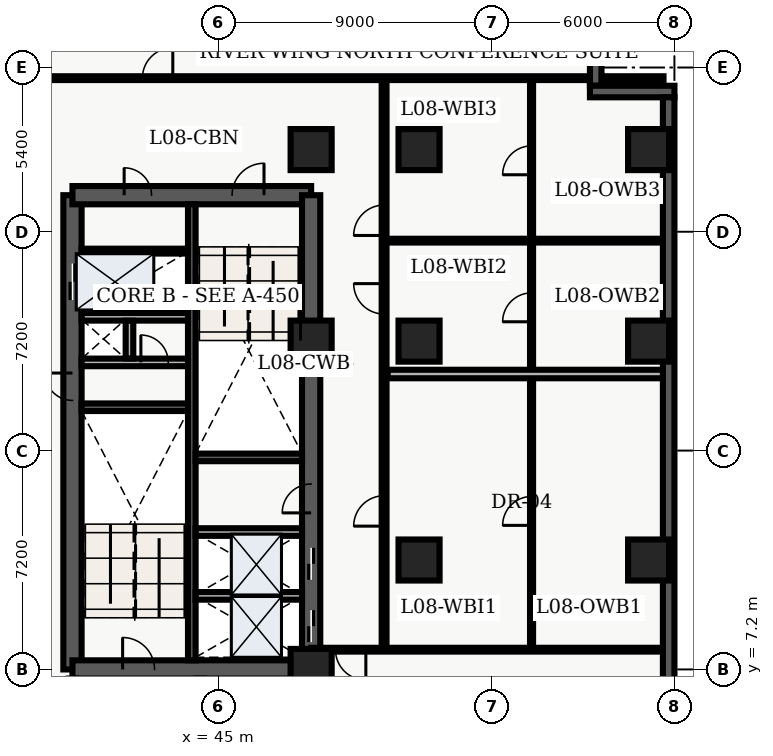
"""IFC4 building model, lengths in metres.
Left out: names, types, materials, properties, quantities, classifications, styles, units other than length and angle.
Written with IfcOpenShell. Run it as: python <this file> out.ifc"""

import sys

from ifc_helpers import new_model, entity, si_unit, converted_unit, direction, frame, origin_with_axes, origin_2d_with_axis, place, context, subcontext, project, spatial, polyline, rectangle, outline, extrude, element, fill, save


model = new_model("IFC4")
c1 = context("Model", 3, precision=1e-05, world=origin_with_axes(), true_north=direction((0.0, 1.0)))
c2 = subcontext(c1, "Body", "Model", "MODEL_VIEW")
j1 = project(units=[si_unit("LENGTHUNIT", "METRE"), converted_unit("PLANEANGLEUNIT", "DEGREE", entity("IfcPlaneAngleMeasure", 0.017), si_unit("PLANEANGLEUNIT", "RADIAN"), dimensions=[0, 0, 0, 0, 0, 0, 0])], contexts=[c1])
p1 = place(None, origin_with_axes())
s1 = spatial("IfcSite", under=j1, at=p1, CompositionType="ELEMENT")
p2 = place(p1, origin_with_axes())
s2 = spatial("IfcBuilding", under=s1, at=p2, CompositionType="ELEMENT")
p3 = place(p2, frame((0.0, 0.0, 36.6), z_axis=(0.0, 0.0, 1.0), x_axis=(1.0, 0.0, 0.0)))
s3 = spatial("IfcBuildingStorey", under=s2, at=p3, CompositionType="ELEMENT", Elevation=36.6)
p4 = place(p3, frame((40.2, 7.2, 0.0), z_axis=(0.0, 0.0, 1.0), x_axis=(0.0, 1.0, 0.0)))
e1 = element("IfcWall", 1, at=p4, inside=s3, PredefinedType="SHEAR", context=c2, shape_type="SweptSolid", body=[
    extrude(outline(polyline([(0.0, -0.3), (15.6, -0.3), (15.6, 0.3), (0.0, 0.3), (0.0, -0.3)])), origin_with_axes(), (0.0, 0.0, 1.0), 3.66),
])
p5 = place(p4, frame((12.75, 0.0, 0.0), z_axis=(0.0, 0.0, 1.0), x_axis=(1.0, 0.0, 0.0)))
e2 = element("IfcOpeningElement", 2, at=p5, cuts=e1, PredefinedType="OPENING", context=c2, shape_type="SweptSolid", body=[
    extrude(rectangle(XDim=1.2, YDim=0.62, at=origin_2d_with_axis()), origin_with_axes(), (0.0, 0.0, 1.0), 2.15),
])
p6 = place(p4, frame((9.3, 0.0, 0.0), z_axis=(0.0, 0.0, 1.0), x_axis=(1.0, 0.0, 0.0)))
e3 = element("IfcOpeningElement", 3, at=p6, cuts=e1, PredefinedType="OPENING", context=c2, shape_type="SweptSolid", body=[
    extrude(rectangle(XDim=0.9, YDim=0.62, at=origin_2d_with_axis()), origin_with_axes(), (0.0, 0.0, 1.0), 2.15),
])
p7 = place(p3, frame((40.2, 7.2, 0.0), z_axis=(0.0, 0.0, 1.0), x_axis=(1.0, 0.0, 0.0)))
e4 = element("IfcWall", 4, at=p7, inside=s3, PredefinedType="SHEAR", context=c2, shape_type="SweptSolid", body=[
    extrude(outline(polyline([(0.0, -0.3), (7.85, -0.3), (7.85, 0.3), (0.0, 0.3), (0.0, -0.3)])), origin_with_axes(), (0.0, 0.0, 1.0), 3.66),
])
p8 = place(p7, frame((2.175, 0.0, 0.0), z_axis=(0.0, 0.0, 1.0), x_axis=(1.0, 0.0, 0.0)))
e5 = element("IfcOpeningElement", 5, at=p8, cuts=e4, PredefinedType="OPENING", context=c2, shape_type="SweptSolid", body=[
    extrude(rectangle(XDim=1.05, YDim=0.62, at=origin_2d_with_axis()), origin_with_axes(), (0.0, 0.0, 1.0), 2.15),
])
p9 = place(p3, frame((40.2, 22.8, 0.0), z_axis=(0.0, 0.0, 1.0), x_axis=(1.0, 0.0, 0.0)))
e6 = element("IfcWall", 6, at=p9, inside=s3, PredefinedType="SHEAR", context=c2, shape_type="SweptSolid", body=[
    extrude(outline(polyline([(0.0, -0.3), (7.85, -0.3), (7.85, 0.3), (0.0, 0.3), (0.0, -0.3)])), origin_with_axes(), (0.0, 0.0, 1.0), 3.66),
])
p10 = place(p9, frame((5.775, 0.0, 0.0), z_axis=(0.0, 0.0, 1.0), x_axis=(1.0, 0.0, 0.0)))
e7 = element("IfcOpeningElement", 7, at=p10, cuts=e6, PredefinedType="OPENING", context=c2, shape_type="SweptSolid", body=[
    extrude(rectangle(XDim=1.05, YDim=0.62, at=origin_2d_with_axis()), origin_with_axes(), (0.0, 0.0, 1.0), 2.15),
])
p11 = place(p9, frame((2.15, 0.0, 0.0), z_axis=(0.0, 0.0, 1.0), x_axis=(1.0, 0.0, 0.0)))
e8 = element("IfcOpeningElement", 8, at=p11, cuts=e6, PredefinedType="OPENING", context=c2, shape_type="SweptSolid", body=[
    extrude(rectangle(XDim=0.9, YDim=0.62, at=origin_2d_with_axis()), origin_with_axes(), (0.0, 0.0, 1.0), 2.15),
])
p12 = place(p3, frame((48.05, 7.2, 0.0), z_axis=(0.0, 0.0, 1.0), x_axis=(0.0, 1.0, 0.0)))
e9 = element("IfcWall", 9, at=p12, inside=s3, PredefinedType="SHEAR", context=c2, shape_type="SweptSolid", body=[
    extrude(outline(polyline([(0.0, -0.3), (15.6, -0.3), (15.6, 0.3), (0.0, 0.3), (0.0, -0.3)])), origin_with_axes(), (0.0, 0.0, 1.0), 3.66),
])
p13 = place(p12, frame((1.425, 0.0, 0.0), z_axis=(0.0, 0.0, 1.0), x_axis=(1.0, 0.0, 0.0)))
e10 = element("IfcOpeningElement", 10, at=p13, cuts=e9, PredefinedType="OPENING", context=c2, shape_type="SweptSolid", body=[
    extrude(rectangle(XDim=1.05, YDim=0.62, at=origin_2d_with_axis()), origin_with_axes(), (0.0, 0.0, 1.0), 2.15),
])
p14 = place(p12, frame((3.475, 0.0, 0.0), z_axis=(0.0, 0.0, 1.0), x_axis=(1.0, 0.0, 0.0)))
e11 = element("IfcOpeningElement", 11, at=p14, cuts=e9, PredefinedType="OPENING", context=c2, shape_type="SweptSolid", body=[
    extrude(rectangle(XDim=1.05, YDim=0.62, at=origin_2d_with_axis()), origin_with_axes(), (0.0, 0.0, 1.0), 2.15),
])
p15 = place(p12, frame((5.625, 0.0, 0.0), z_axis=(0.0, 0.0, 1.0), x_axis=(1.0, 0.0, 0.0)))
e12 = element("IfcOpeningElement", 12, at=p15, cuts=e9, PredefinedType="OPENING", context=c2, shape_type="SweptSolid", body=[
    extrude(rectangle(XDim=0.95, YDim=0.62, at=origin_2d_with_axis()), origin_with_axes(), (0.0, 0.0, 1.0), 2.15),
])
p16 = place(p3, frame((44.125, 7.5, 0.0), z_axis=(0.0, 0.0, 1.0), x_axis=(0.0, 1.0, 0.0)))
e13 = element("IfcWall", 13, at=p16, inside=s3, PredefinedType="SHEAR", context=c2, shape_type="SweptSolid", body=[
    extrude(outline(polyline([(0.0, -0.125), (15.0, -0.125), (15.0, 0.125), (0.0, 0.125), (0.0, -0.125)])), origin_with_axes(), (0.0, 0.0, 1.0), 3.66),
])
for number, where, z_axis, x_axis in (
    (14, (40.5, 15.825, 0.0), (0.0, 0.0, 1.0), (1.0, 0.0, 0.0)),
    (15, (44.25, 14.175, 0.0), (0.0, 0.0, 1.0), (1.0, 0.0, 0.0)),
):
    element("IfcWall", number, at=place(p3, frame(where, z_axis=z_axis, x_axis=x_axis)), inside=s3, PredefinedType="SHEAR", context=c2, shape_type="SweptSolid", body=[
        extrude(outline(polyline([(0.0, -0.125), (3.5, -0.125), (3.5, 0.125), (0.0, 0.125), (0.0, -0.125)])), origin_with_axes(), (0.0, 0.0, 1.0), 3.66),
    ])
p17 = place(p3, frame((40.5, 17.3, 0.0), z_axis=(0.0, 0.0, 1.0), x_axis=(1.0, 0.0, 0.0)))
e16 = element("IfcWall", 16, at=p17, inside=s3, PredefinedType="SOLIDWALL", context=c2, shape_type="SweptSolid", body=[
    extrude(outline(polyline([(0.0, -0.125), (3.5, -0.125), (3.5, 0.125), (0.0, 0.125), (0.0, -0.125)])), origin_with_axes(), (0.0, 0.0, 1.0), 2.7),
])
p18 = place(p17, frame((2.4, 0.0, 0.0), z_axis=(0.0, 0.0, 1.0), x_axis=(1.0, 0.0, 0.0)))
e17 = element("IfcOpeningElement", 17, at=p18, cuts=e16, PredefinedType="OPENING", context=c2, shape_type="SweptSolid", body=[
    extrude(rectangle(XDim=0.9, YDim=0.27, at=origin_2d_with_axis()), origin_with_axes(), (0.0, 0.0, 1.0), 2.15),
])
p19 = place(p3, frame((40.5, 18.8, 0.0), z_axis=(0.0, 0.0, 1.0), x_axis=(1.0, 0.0, 0.0)))
e18 = element("IfcWall", 18, at=p19, inside=s3, PredefinedType="SOLIDWALL", context=c2, shape_type="SweptSolid", body=[
    extrude(outline(polyline([(0.0, -0.125), (3.5, -0.125), (3.5, 0.125), (0.0, 0.125), (0.0, -0.125)])), origin_with_axes(), (0.0, 0.0, 1.0), 2.7),
])
p20 = place(p3, frame((42.075, 17.43, 0.0), z_axis=(0.0, 0.0, 1.0), x_axis=(0.0, 1.0, 0.0)))
e19 = element("IfcWall", 19, at=p20, inside=s3, PredefinedType="SOLIDWALL", context=c2, shape_type="SweptSolid", body=[
    extrude(outline(polyline([(0.0, -0.125), (1.24, -0.125), (1.24, 0.125), (0.0, 0.125), (0.0, -0.125)])), origin_with_axes(), (0.0, 0.0, 1.0), 2.7),
])
for number, where, z_axis, x_axis in (
    (20, (48.05, 7.2, 0.0), (0.0, 0.0, 1.0), (1.0, 0.0, 0.0)),
    (21, (48.05, 18.0, 0.0), (0.0, 0.0, 1.0), (1.0, 0.0, 0.0)),
    (22, (48.05, 24.3, 0.0), (0.0, 0.0, 1.0), (1.0, 0.0, 0.0)),
    (23, (51.6, 10.8, 0.0), (0.0, 0.0, 1.0), (1.0, 0.0, 0.0)),
    (24, (51.6, 18.0, 0.0), (0.0, 0.0, 1.0), (1.0, 0.0, 0.0)),
    (25, (51.6, 24.3, 0.0), (0.0, 0.0, 1.0), (1.0, 0.0, 0.0)),
    (26, (59.15, 10.8, 0.0), (0.0, 0.0, 1.0), (1.0, 0.0, 0.0)),
    (27, (59.15, 18.0, 0.0), (0.0, 0.0, 1.0), (1.0, 0.0, 0.0)),
    (28, (59.15, 24.3, 0.0), (0.0, 0.0, 1.0), (1.0, 0.0, 0.0)),
):
    element("IfcColumn", number, at=place(p3, frame(where, z_axis=z_axis, x_axis=x_axis)), inside=s3, PredefinedType="COLUMN", context=c2, shape_type="SweptSolid", body=[
        extrude(rectangle(XDim=1.35, YDim=1.35, at=origin_2d_with_axis()), origin_with_axes(), (0.0, 0.0, 1.0), 3.9),
    ])
p21 = place(p3, frame((40.5, 20.96, 0.0), z_axis=(0.0, 0.0, 1.0), x_axis=(1.0, 0.0, 0.0)))
e29 = element("IfcWall", 29, at=p21, inside=s3, PredefinedType="PARTITIONING", context=c2, shape_type="SweptSolid", body=[
    extrude(outline(polyline([(0.0, -0.08), (3.5, -0.08), (3.5, 0.08), (0.0, 0.08), (0.0, -0.08)])), origin_with_axes(), (0.0, 0.0, 1.0), 2.7),
])
for number, where, z_axis, x_axis in (
    (30, (44.25, 9.62, 0.0), (0.0, 0.0, 1.0), (1.0, 0.0, 0.0)),
    (31, (44.25, 11.72, 0.0), (0.0, 0.0, 1.0), (1.0, 0.0, 0.0)),
):
    element("IfcWall", number, at=place(p3, frame(where, z_axis=z_axis, x_axis=x_axis)), inside=s3, PredefinedType="SOLIDWALL", context=c2, shape_type="SweptSolid", body=[
        extrude(outline(polyline([(0.0, -0.125), (3.5, -0.125), (3.5, 0.125), (0.0, 0.125), (0.0, -0.125)])), origin_with_axes(), (0.0, 0.0, 1.0), 2.7),
    ])
p22 = place(p3, frame((50.45, 7.85, 0.0), z_axis=(0.0, 0.0, 1.0), x_axis=(0.0, 1.0, 0.0)))
e32 = element("IfcWall", 32, at=p22, inside=s3, PredefinedType="PARTITIONING", context=c2, shape_type="SweptSolid", body=[
    extrude(outline(polyline([(0.0, -0.08), (18.8, -0.08), (18.8, 0.08), (0.0, 0.08), (0.0, -0.08)])), origin_with_axes(), (0.0, 0.0, 1.0), 2.7),
])
p23 = place(p22, frame((4.564, 0.0, 0.0), z_axis=(0.0, 0.0, 1.0), x_axis=(1.0, 0.0, 0.0)))
e33 = element("IfcOpeningElement", 33, at=p23, cuts=e32, PredefinedType="OPENING", context=c2, shape_type="SweptSolid", body=[
    extrude(rectangle(XDim=1.0, YDim=0.18, at=origin_2d_with_axis()), origin_with_axes(), (0.0, 0.0, 1.0), 2.15),
])
p24 = place(p22, frame((11.541, 0.0, 0.0), z_axis=(0.0, 0.0, 1.0), x_axis=(1.0, 0.0, 0.0)))
e34 = element("IfcOpeningElement", 34, at=p24, cuts=e32, PredefinedType="OPENING", context=c2, shape_type="SweptSolid", body=[
    extrude(rectangle(XDim=1.0, YDim=0.18, at=origin_2d_with_axis()), origin_with_axes(), (0.0, 0.0, 1.0), 2.15),
])
p25 = place(p22, frame((14.125, 0.0, 0.0), z_axis=(0.0, 0.0, 1.0), x_axis=(1.0, 0.0, 0.0)))
e35 = element("IfcOpeningElement", 35, at=p25, cuts=e32, PredefinedType="OPENING", context=c2, shape_type="SweptSolid", body=[
    extrude(rectangle(XDim=1.0, YDim=0.18, at=origin_2d_with_axis()), origin_with_axes(), (0.0, 0.0, 1.0), 2.15),
])
p26 = place(p3, frame((59.64, 7.85, 0.0), z_axis=(0.0, 0.0, 1.0), x_axis=(-1.0, 0.0, 0.0)))
e36 = element("IfcWall", 36, at=p26, inside=s3, PredefinedType="PARTITIONING", context=c2, shape_type="SweptSolid", body=[
    extrude(outline(polyline([(0.0, -0.062), (11.59, -0.062), (11.59, 0.062), (0.0, 0.062), (0.0, -0.062)])), origin_with_axes(), (0.0, 0.0, 1.0), 2.7),
])
p27 = place(p26, frame((10.29, 0.0, 0.0), z_axis=(0.0, 0.0, 1.0), x_axis=(1.0, 0.0, 0.0)))
e37 = element("IfcOpeningElement", 37, at=p27, cuts=e36, PredefinedType="OPENING", context=c2, shape_type="SweptSolid", body=[
    extrude(rectangle(XDim=1.0, YDim=0.145, at=origin_2d_with_axis()), origin_with_axes(), (0.0, 0.0, 1.0), 2.15),
])
p28 = place(p3, frame((38.76, 26.65, 0.0), z_axis=(0.0, 0.0, 1.0), x_axis=(1.0, 0.0, 0.0)))
e38 = element("IfcWall", 38, at=p28, inside=s3, PredefinedType="PARTITIONING", context=c2, shape_type="SweptSolid", body=[
    extrude(outline(polyline([(0.0, -0.062), (20.88, -0.062), (20.88, 0.062), (0.0, 0.062), (0.0, -0.062)])), origin_with_axes(), (0.0, 0.0, 1.0), 2.7),
])
p29 = place(p28, frame((4.24, 0.0, 0.0), z_axis=(0.0, 0.0, 1.0), x_axis=(1.0, 0.0, 0.0)))
e39 = element("IfcOpeningElement", 39, at=p29, cuts=e38, PredefinedType="OPENING", context=c2, shape_type="SweptSolid", body=[
    extrude(rectangle(XDim=1.0, YDim=0.145, at=origin_2d_with_axis()), origin_with_axes(), (0.0, 0.0, 1.0), 2.15),
])
p30 = place(p3, frame((55.3, 7.98, 0.0), z_axis=(0.0, 0.0, 1.0), x_axis=(0.0, 1.0, 0.0)))
e40 = element("IfcWall", 40, at=p30, inside=s3, PredefinedType="PARTITIONING", context=c2, shape_type="SweptSolid", body=[
    extrude(outline(polyline([(0.0, -0.05), (18.54, -0.05), (18.54, 0.05), (0.0, 0.05), (0.0, -0.05)])), origin_with_axes(), (0.0, 0.0, 1.0), 2.7),
])
p31 = place(p30, frame((4.434, 0.0, 0.0), z_axis=(0.0, 0.0, 1.0), x_axis=(1.0, 0.0, 0.0)))
e41 = element("IfcOpeningElement", 41, at=p31, cuts=e40, PredefinedType="OPENING", context=c2, shape_type="SweptSolid", body=[
    extrude(rectangle(XDim=0.95, YDim=0.12, at=origin_2d_with_axis()), origin_with_axes(), (0.0, 0.0, 1.0), 2.15),
])
p32 = place(p30, frame((11.132, 0.0, 0.0), z_axis=(0.0, 0.0, 1.0), x_axis=(1.0, 0.0, 0.0)))
e42 = element("IfcOpeningElement", 42, at=p32, cuts=e40, PredefinedType="OPENING", context=c2, shape_type="SweptSolid", body=[
    extrude(rectangle(XDim=0.95, YDim=0.12, at=origin_2d_with_axis()), origin_with_axes(), (0.0, 0.0, 1.0), 2.15),
])
p33 = place(p30, frame((15.967, 0.0, 0.0), z_axis=(0.0, 0.0, 1.0), x_axis=(1.0, 0.0, 0.0)))
e43 = element("IfcOpeningElement", 43, at=p33, cuts=e40, PredefinedType="OPENING", context=c2, shape_type="SweptSolid", body=[
    extrude(rectangle(XDim=0.95, YDim=0.12, at=origin_2d_with_axis()), origin_with_axes(), (0.0, 0.0, 1.0), 2.15),
])
p34 = place(p3, frame((50.57, 16.918, 0.0), z_axis=(0.0, 0.0, 1.0), x_axis=(1.0, 0.0, 0.0)))
e44 = element("IfcWall", 44, at=p34, inside=s3, PredefinedType="PARTITIONING", context=c2, shape_type="SweptSolid", body=[
    extrude(outline(polyline([(0.0, -0.14), (9.055, -0.14), (9.055, 0.14), (0.0, 0.14), (0.0, -0.14)])), origin_with_axes(), (0.0, 0.0, 1.0), 2.7),
])
p35 = place(p3, frame((50.57, 21.305, 0.0), z_axis=(0.0, 0.0, 1.0), x_axis=(1.0, 0.0, 0.0)))
e45 = element("IfcWall", 45, at=p35, inside=s3, PredefinedType="PARTITIONING", context=c2, shape_type="SweptSolid", body=[
    extrude(outline(polyline([(0.0, -0.062), (9.055, -0.062), (9.055, 0.062), (0.0, 0.062), (0.0, -0.062)])), origin_with_axes(), (0.0, 0.0, 1.0), 2.7),
])
p36 = place(p3, frame((57.41, 28.42, 0.0), z_axis=(0.0, 0.0, 1.0), x_axis=(0.0, -1.0, 0.0)))
e46 = element("IfcWall", 46, at=p36, inside=s3, PredefinedType="SOLIDWALL", context=c2, shape_type="SweptSolid", body=[
    extrude(outline(polyline([(0.0, -0.19), (2.02, -0.19), (2.02, 0.19), (0.0, 0.19), (0.0, -0.19)])), origin_with_axes(), (0.0, 0.0, 1.0), 3.66),
])
p37 = place(p3, frame((57.22, 26.21, 0.0), z_axis=(0.0, 0.0, 1.0), x_axis=(1.0, 0.0, 0.0)))
e47 = element("IfcWall", 47, at=p37, inside=s3, PredefinedType="SOLIDWALL", context=c2, shape_type="SweptSolid", body=[
    extrude(outline(polyline([(0.0, -0.19), (2.78, -0.19), (2.78, 0.19), (0.0, 0.19), (0.0, -0.19)])), origin_with_axes(), (0.0, 0.0, 1.0), 3.66),
])
p38 = place(p3, frame((59.81, 26.02, 0.0), z_axis=(0.0, 0.0, 1.0), x_axis=(0.0, -1.0, 0.0)))
e48 = element("IfcWall", 48, at=p38, inside=s3, PredefinedType="SOLIDWALL", context=c2, shape_type="SweptSolid", body=[
    extrude(outline(polyline([(0.0, -0.19), (23.62, -0.19), (23.62, 0.19), (0.0, 0.19), (0.0, -0.19)])), origin_with_axes(), (0.0, 0.0, 1.0), 3.66),
])
p39 = place(p38, frame((20.218, 0.0, 0.45), z_axis=(0.0, 0.0, 1.0), x_axis=(1.0, 0.0, 0.0)))
e49 = element("IfcOpeningElement", 49, at=p39, cuts=e48, PredefinedType="OPENING", context=c2, shape_type="SweptSolid", body=[
    extrude(rectangle(XDim=2.1, YDim=0.4, at=origin_2d_with_axis()), origin_with_axes(), (0.0, 0.0, 1.0), 2.2),
])
p40 = place(p12, frame((1.425, 0.0, 0.0), z_axis=(0.0, 0.0, 1.0), x_axis=(1.0, 0.0, 0.0)))
e50 = element("IfcDoor", 50, at=p40, inside=s3, OperationType="SLIDING_TO_LEFT", PredefinedType="DOOR", context=c2, shape_type="SweptSolid", body=[
    extrude(rectangle(XDim=1.05, YDim=0.09, at=origin_2d_with_axis()), origin_with_axes(), (0.0, 0.0, 1.0), 2.15),
])
fill(e10, e50)
p41 = place(p12, frame((3.475, 0.0, 0.0), z_axis=(0.0, 0.0, 1.0), x_axis=(1.0, 0.0, 0.0)))
e51 = element("IfcDoor", 51, at=p41, inside=s3, OperationType="SLIDING_TO_RIGHT", PredefinedType="DOOR", context=c2, shape_type="SweptSolid", body=[
    extrude(rectangle(XDim=1.05, YDim=0.09, at=origin_2d_with_axis()), origin_with_axes(), (0.0, 0.0, 1.0), 2.15),
])
fill(e11, e51)
p42 = place(p4, frame((12.75, 0.0, 0.0), z_axis=(0.0, 0.0, 1.0), x_axis=(1.0, 0.0, 0.0)))
e52 = element("IfcDoor", 52, at=p42, inside=s3, OperationType="DOUBLE_DOOR_SLIDING", PredefinedType="DOOR", context=c2, shape_type="SweptSolid", body=[
    extrude(rectangle(XDim=1.2, YDim=0.09, at=origin_2d_with_axis()), origin_with_axes(), (0.0, 0.0, 1.0), 2.15),
])
fill(e2, e52)
p43 = place(p4, frame((9.3, 0.0, 0.0), z_axis=(0.0, 0.0, 1.0), x_axis=(1.0, 0.0, 0.0)))
e53 = element("IfcDoor", 53, at=p43, inside=s3, OperationType="SINGLE_SWING_RIGHT", PredefinedType="DOOR", context=c2, shape_type="SweptSolid", body=[
    extrude(rectangle(XDim=0.9, YDim=0.09, at=origin_2d_with_axis()), origin_with_axes(), (0.0, 0.0, 1.0), 2.15),
])
fill(e3, e53)
p44 = place(p17, frame((2.4, 0.0, 0.0), z_axis=(0.0, 0.0, 1.0), x_axis=(1.0, 0.0, 0.0)))
e54 = element("IfcDoor", 54, at=p44, inside=s3, OperationType="SINGLE_SWING_LEFT", PredefinedType="DOOR", context=c2, shape_type="SweptSolid", body=[
    extrude(rectangle(XDim=0.9, YDim=0.09, at=origin_2d_with_axis()), origin_with_axes(), (0.0, 0.0, 1.0), 2.15),
])
fill(e17, e54)
p45 = place(p7, frame((2.175, 0.0, 0.0), z_axis=(0.0, 0.0, 1.0), x_axis=(1.0, 0.0, 0.0)))
e55 = element("IfcDoor", 55, at=p45, inside=s3, OperationType="SINGLE_SWING_LEFT", PredefinedType="DOOR", context=c2, shape_type="SweptSolid", body=[
    extrude(rectangle(XDim=1.05, YDim=0.09, at=origin_2d_with_axis()), origin_with_axes(), (0.0, 0.0, 1.0), 2.15),
])
fill(e5, e55)
p46 = place(p9, frame((5.775, 0.0, 0.0), z_axis=(0.0, 0.0, 1.0), x_axis=(1.0, 0.0, 0.0)))
e56 = element("IfcDoor", 56, at=p46, inside=s3, OperationType="SINGLE_SWING_RIGHT", PredefinedType="DOOR", context=c2, shape_type="SweptSolid", body=[
    extrude(rectangle(XDim=1.05, YDim=0.09, at=origin_2d_with_axis()), origin_with_axes(), (0.0, 0.0, 1.0), 2.15),
])
fill(e7, e56)
p47 = place(p9, frame((2.15, 0.0, 0.0), z_axis=(0.0, 0.0, 1.0), x_axis=(1.0, 0.0, 0.0)))
e57 = element("IfcDoor", 57, at=p47, inside=s3, OperationType="SINGLE_SWING_LEFT", PredefinedType="DOOR", context=c2, shape_type="SweptSolid", body=[
    extrude(rectangle(XDim=0.9, YDim=0.09, at=origin_2d_with_axis()), origin_with_axes(), (0.0, 0.0, 1.0), 2.15),
])
fill(e8, e57)
p48 = place(p12, frame((5.625, 0.0, 0.0), z_axis=(0.0, 0.0, 1.0), x_axis=(1.0, 0.0, 0.0)))
e58 = element("IfcDoor", 58, at=p48, inside=s3, OperationType="SINGLE_SWING_LEFT", PredefinedType="DOOR", context=c2, shape_type="SweptSolid", body=[
    extrude(rectangle(XDim=0.95, YDim=0.09, at=origin_2d_with_axis()), origin_with_axes(), (0.0, 0.0, 1.0), 2.15),
])
fill(e12, e58)
p49 = place(p26, frame((10.29, 0.0, 0.0), z_axis=(0.0, 0.0, 1.0), x_axis=(1.0, 0.0, 0.0)))
e59 = element("IfcDoor", 59, at=p49, inside=s3, OperationType="SINGLE_SWING_LEFT", PredefinedType="DOOR", context=c2, shape_type="SweptSolid", body=[
    extrude(rectangle(XDim=1.0, YDim=0.075, at=origin_2d_with_axis()), origin_with_axes(), (0.0, 0.0, 1.0), 2.15),
])
fill(e37, e59)
p50 = place(p28, frame((4.24, 0.0, 0.0), z_axis=(0.0, 0.0, 1.0), x_axis=(1.0, 0.0, 0.0)))
e60 = element("IfcDoor", 60, at=p50, inside=s3, OperationType="SINGLE_SWING_RIGHT", PredefinedType="DOOR", context=c2, shape_type="SweptSolid", body=[
    extrude(rectangle(XDim=1.0, YDim=0.075, at=origin_2d_with_axis()), origin_with_axes(), (0.0, 0.0, 1.0), 2.15),
])
fill(e39, e60)
p51 = place(p30, frame((4.434, 0.0, 0.0), z_axis=(0.0, 0.0, 1.0), x_axis=(1.0, 0.0, 0.0)))
e61 = element("IfcDoor", 61, at=p51, inside=s3, OperationType="SINGLE_SWING_LEFT", PredefinedType="DOOR", context=c2, shape_type="SweptSolid", body=[
    extrude(rectangle(XDim=0.95, YDim=0.06, at=origin_2d_with_axis()), origin_with_axes(), (0.0, 0.0, 1.0), 2.15),
])
fill(e41, e61)
p52 = place(p22, frame((4.564, 0.0, 0.0), z_axis=(0.0, 0.0, 1.0), x_axis=(1.0, 0.0, 0.0)))
e62 = element("IfcDoor", 62, at=p52, inside=s3, OperationType="SINGLE_SWING_LEFT", PredefinedType="DOOR", context=c2, shape_type="SweptSolid", body=[
    extrude(rectangle(XDim=1.0, YDim=0.09, at=origin_2d_with_axis()), origin_with_axes(), (0.0, 0.0, 1.0), 2.15),
])
fill(e33, e62)
p53 = place(p30, frame((11.132, 0.0, 0.0), z_axis=(0.0, 0.0, 1.0), x_axis=(1.0, 0.0, 0.0)))
e63 = element("IfcDoor", 63, at=p53, inside=s3, OperationType="SINGLE_SWING_LEFT", PredefinedType="DOOR", context=c2, shape_type="SweptSolid", body=[
    extrude(rectangle(XDim=0.95, YDim=0.06, at=origin_2d_with_axis()), origin_with_axes(), (0.0, 0.0, 1.0), 2.15),
])
fill(e42, e63)
p54 = place(p22, frame((11.541, 0.0, 0.0), z_axis=(0.0, 0.0, 1.0), x_axis=(1.0, 0.0, 0.0)))
e64 = element("IfcDoor", 64, at=p54, inside=s3, OperationType="SINGLE_SWING_RIGHT", PredefinedType="DOOR", context=c2, shape_type="SweptSolid", body=[
    extrude(rectangle(XDim=1.0, YDim=0.09, at=origin_2d_with_axis()), origin_with_axes(), (0.0, 0.0, 1.0), 2.15),
])
fill(e34, e64)
p55 = place(p30, frame((15.967, 0.0, 0.0), z_axis=(0.0, 0.0, 1.0), x_axis=(1.0, 0.0, 0.0)))
e65 = element("IfcDoor", 65, at=p55, inside=s3, OperationType="SINGLE_SWING_LEFT", PredefinedType="DOOR", context=c2, shape_type="SweptSolid", body=[
    extrude(rectangle(XDim=0.95, YDim=0.06, at=origin_2d_with_axis()), origin_with_axes(), (0.0, 0.0, 1.0), 2.15),
])
fill(e43, e65)
p56 = place(p22, frame((14.125, 0.0, 0.0), z_axis=(0.0, 0.0, 1.0), x_axis=(1.0, 0.0, 0.0)))
e66 = element("IfcDoor", 66, at=p56, inside=s3, OperationType="SINGLE_SWING_LEFT", PredefinedType="DOOR", context=c2, shape_type="SweptSolid", body=[
    extrude(rectangle(XDim=1.0, YDim=0.09, at=origin_2d_with_axis()), origin_with_axes(), (0.0, 0.0, 1.0), 2.15),
])
fill(e35, e66)
save(model, sys.argv[1])
